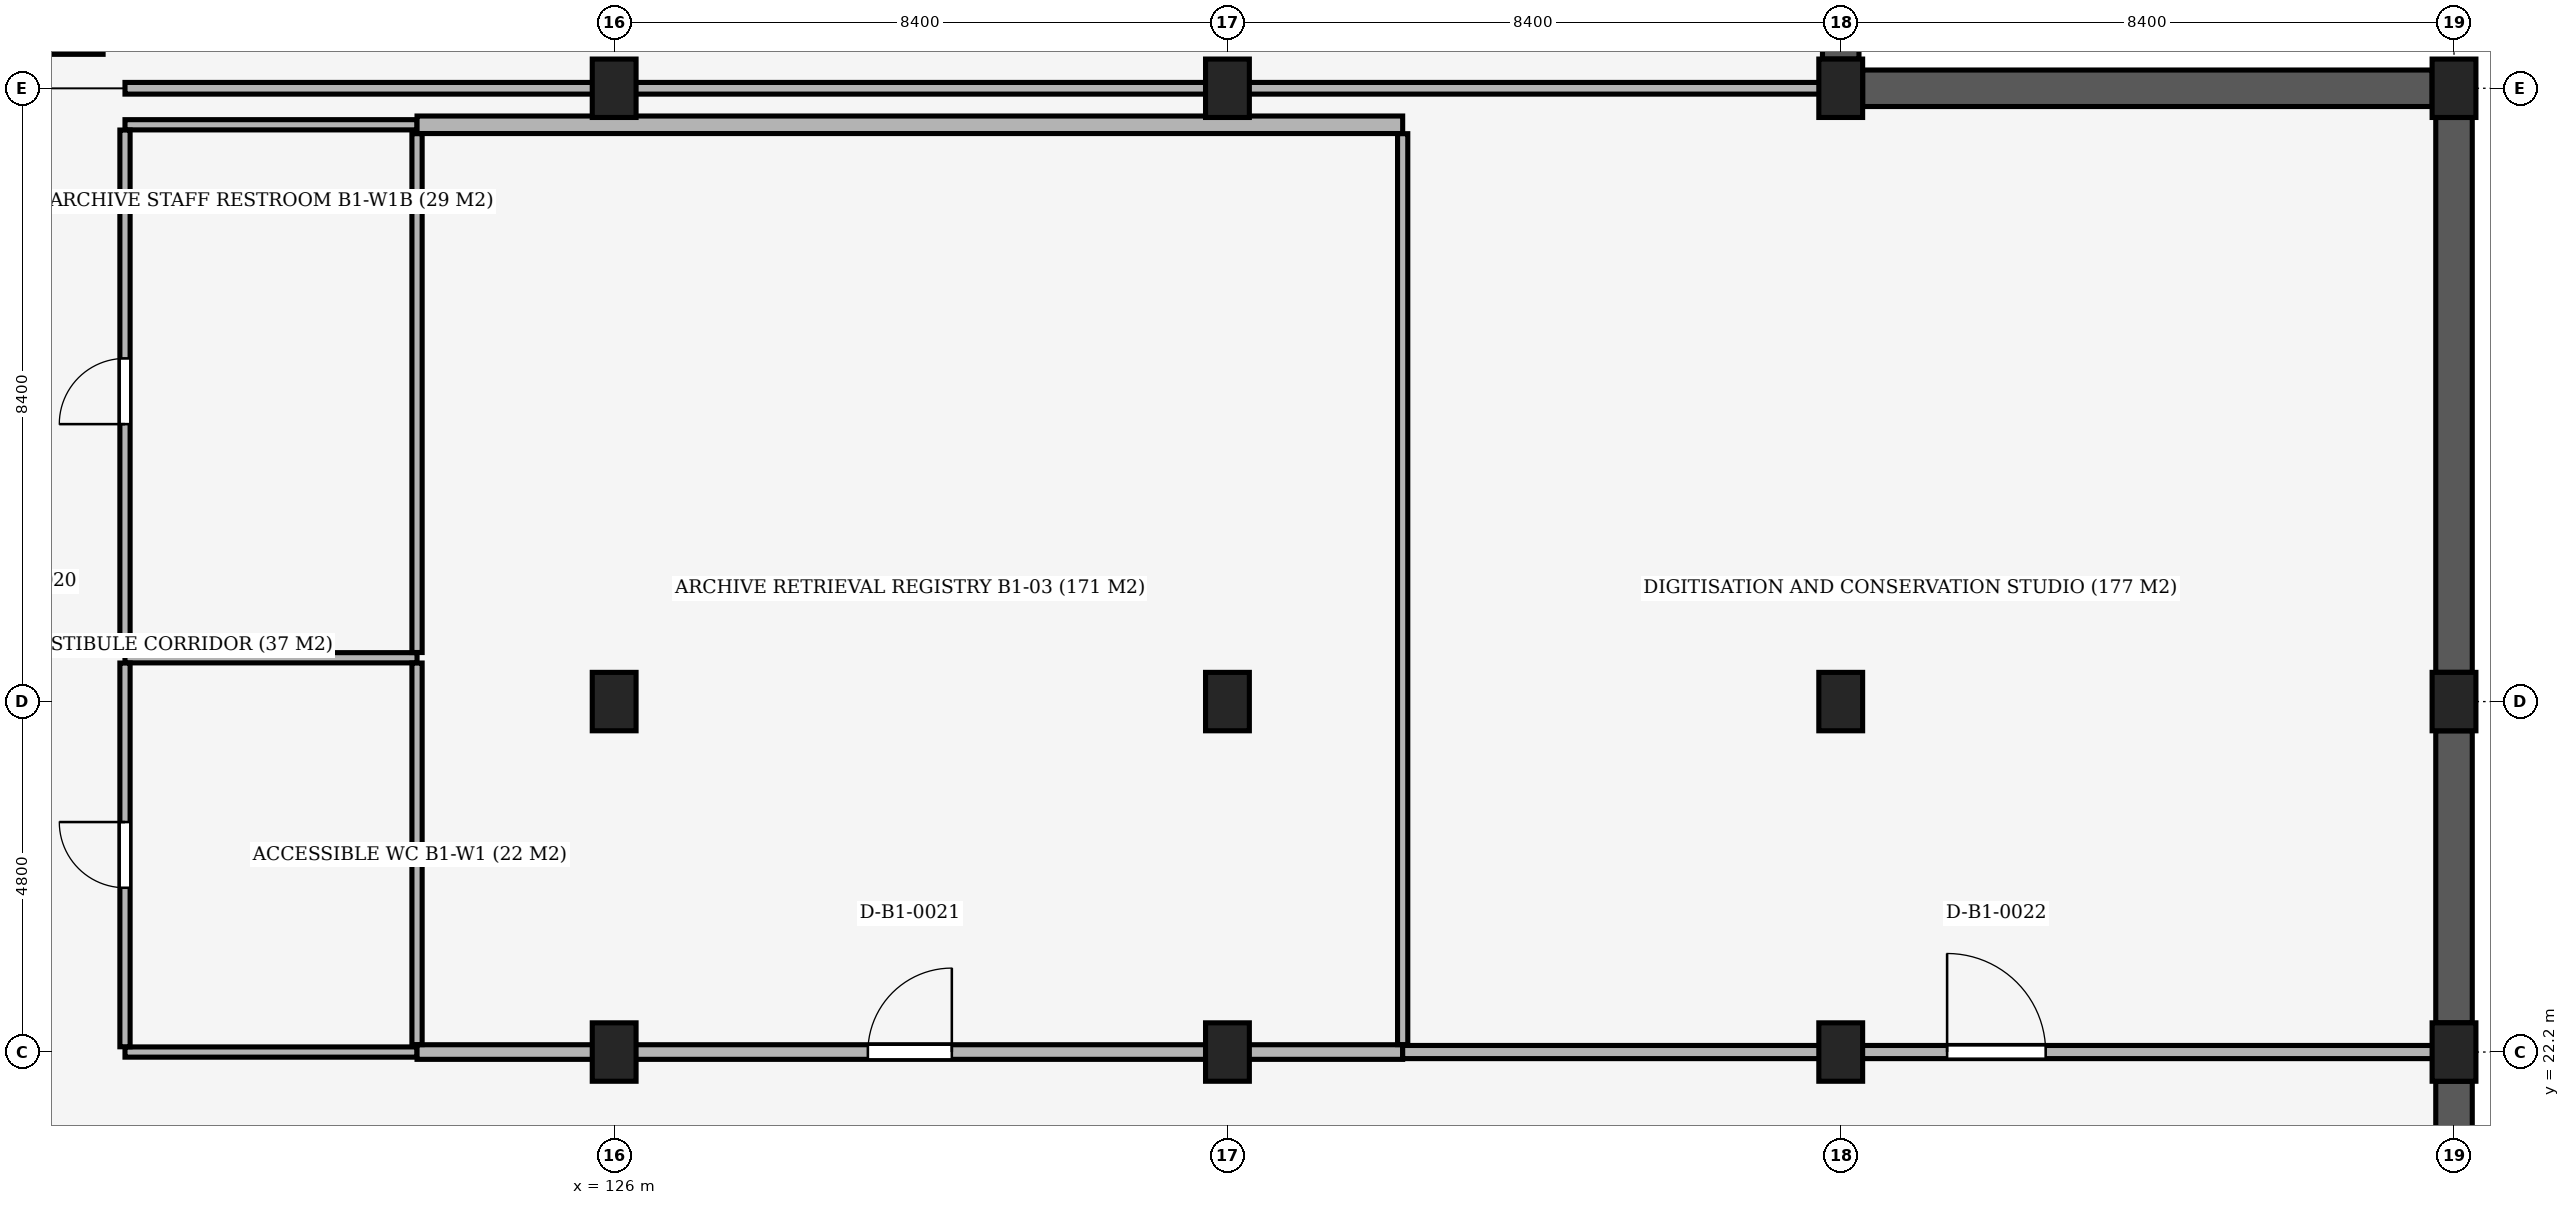
"""IFC4 building model, lengths in metres.
Left out: names, types, materials, properties, quantities, classifications, styles, units other than length and angle.
Written with IfcOpenShell. Run it as: python <this file> out.ifc"""

import sys

from ifc_helpers import new_model, si_unit, direction, frame, frame_2d, origin, origin_2d, place, context, subcontext, project, spatial, rectangle, extrude, element, fill, save


model = new_model("IFC4")
c1 = context("Model", 3, precision=1e-05, world=origin(), true_north=direction((0.0, 1.0)))
c2 = subcontext(c1, "Body", "Model", "MODEL_VIEW")
j1 = project(units=[si_unit("LENGTHUNIT", "METRE"), si_unit("PLANEANGLEUNIT", "RADIAN")], contexts=[c1])
p1 = place(None, origin())
s1 = spatial("IfcSite", under=j1, at=p1, CompositionType="ELEMENT")
p2 = place(p1, origin())
s2 = spatial("IfcBuilding", under=s1, at=p2, CompositionType="ELEMENT")
p3 = place(p2, frame((0.0, 0.0, -4.8)))
s3 = spatial("IfcBuildingStorey", under=s2, at=p3, CompositionType="ELEMENT", Elevation=-4.8)
for number, where, z_axis, x_axis in (
    (1, (126.0, 22.2, 0.0), (0.0, 0.0, 1.0), (1.0, 0.0, 0.0)),
    (2, (126.0, 27.0, 0.0), (0.0, 0.0, 1.0), (1.0, 0.0, 0.0)),
    (3, (126.0, 35.4, 0.0), (0.0, 0.0, 1.0), (1.0, 0.0, 0.0)),
    (4, (134.4, 22.2, 0.0), (0.0, 0.0, 1.0), (1.0, 0.0, 0.0)),
    (5, (134.4, 27.0, 0.0), (0.0, 0.0, 1.0), (1.0, 0.0, 0.0)),
    (6, (134.4, 35.4, 0.0), (0.0, 0.0, 1.0), (1.0, 0.0, 0.0)),
    (7, (142.8, 22.2, 0.0), (0.0, 0.0, 1.0), (1.0, 0.0, 0.0)),
    (8, (142.8, 27.0, 0.0), (0.0, 0.0, 1.0), (1.0, 0.0, 0.0)),
    (9, (142.8, 35.4, 0.0), (0.0, 0.0, 1.0), (1.0, 0.0, 0.0)),
    (10, (151.2, 22.2, 0.0), (0.0, 0.0, 1.0), (1.0, 0.0, 0.0)),
    (11, (151.2, 27.0, 0.0), (0.0, 0.0, 1.0), (1.0, 0.0, 0.0)),
    (12, (151.2, 35.4, 0.0), (0.0, 0.0, 1.0), (1.0, 0.0, 0.0)),
):
    element("IfcColumn", number, at=place(p3, frame(where, z_axis=z_axis, x_axis=x_axis)), inside=s3, PredefinedType="COLUMN", context=c2, shape_type="SweptSolid", body=[
        extrude(rectangle(XDim=0.6, YDim=0.8, at=origin_2d()), origin(), (0.0, 0.0, 1.0), 4.8),
    ])
p4 = place(p3, frame((142.8, 40.525, 0.0), z_axis=(0.0, 0.0, 1.0), x_axis=(0.0, -1.0, 0.0)))
e13 = element("IfcWall", 13, at=p4, inside=s3, PredefinedType="USERDEFINED", context=c2, shape_type="SweptSolid", body=[
    extrude(rectangle(XDim=4.725, YDim=0.5, at=frame_2d((2.362, 0.0))), origin(), (0.0, 0.0, 1.0), 3.85),
])
p5 = place(p3, frame((143.1, 35.4, 0.0), z_axis=(0.0, 0.0, 1.0), x_axis=(1.0, 0.0, 0.0)))
e14 = element("IfcWall", 14, at=p5, inside=s3, PredefinedType="USERDEFINED", context=c2, shape_type="SweptSolid", body=[
    extrude(rectangle(XDim=7.8, YDim=0.5, at=frame_2d((3.9, 0.0))), origin(), (0.0, 0.0, 1.0), 3.75),
])
p6 = place(p3, frame((151.2, 35.0, 0.0), z_axis=(0.0, 0.0, 1.0), x_axis=(0.0, -1.0, 0.0)))
e15 = element("IfcWall", 15, at=p6, inside=s3, PredefinedType="USERDEFINED", context=c2, shape_type="SweptSolid", body=[
    extrude(rectangle(XDim=7.6, YDim=0.5, at=frame_2d((3.8, 0.0))), origin(), (0.0, 0.0, 1.0), 3.7),
])
p7 = place(p3, frame((151.2, 26.6, 0.0), z_axis=(0.0, 0.0, 1.0), x_axis=(0.0, -1.0, 0.0)))
e16 = element("IfcWall", 16, at=p7, inside=s3, PredefinedType="USERDEFINED", context=c2, shape_type="SweptSolid", body=[
    extrude(rectangle(XDim=4.0, YDim=0.5, at=frame_2d((2.0, 0.0))), origin(), (0.0, 0.0, 1.0), 3.85),
])
p8 = place(p3, frame((151.2, 21.8, 0.0), z_axis=(0.0, 0.0, 1.0), x_axis=(0.0, -1.0, 0.0)))
e17 = element("IfcWall", 17, at=p8, inside=s3, PredefinedType="USERDEFINED", context=c2, shape_type="SweptSolid", body=[
    extrude(rectangle(XDim=16.0, YDim=0.5, at=frame_2d((8.0, 0.0))), origin(), (0.0, 0.0, 1.0), 3.35),
])
p9 = place(p3, frame((117.69, 36.09, 0.0), z_axis=(0.0, 0.0, 1.0), x_axis=(1.0, 0.0, 0.0)))
e18 = element("IfcWall", 18, at=p9, inside=s3, PredefinedType="USERDEFINED", context=c2, shape_type="SweptSolid", body=[
    extrude(rectangle(XDim=1.31, YDim=0.45, at=frame_2d((0.655, 0.0))), origin(), (0.0, 0.0, 1.0), 0.55),
])
p10 = place(p3, frame((119.3, 22.2, 0.0), z_axis=(0.0, 0.0, 1.0), x_axis=(1.0, 0.0, 0.0)))
e19 = element("IfcWall", 19, at=p10, inside=s3, PredefinedType="PARTITIONING", context=c2, shape_type="SweptSolid", body=[
    extrude(rectangle(XDim=4.0, YDim=0.14, at=frame_2d((2.0, 0.0))), origin(), (0.0, 0.0, 1.0), 3.75),
])
p11 = place(p3, frame((123.3, 22.2, 0.0), z_axis=(0.0, 0.0, 1.0), x_axis=(1.0, 0.0, 0.0)))
e20 = element("IfcWall", 20, at=p11, inside=s3, PredefinedType="PARTITIONING", context=c2, shape_type="SweptSolid", body=[
    extrude(rectangle(XDim=13.5, YDim=0.2, at=frame_2d((6.75, 0.0))), origin(), (0.0, 0.0, 1.0), 3.35),
])
p12 = place(p11, frame((6.175, 0.0, 0.0)))
e21 = element("IfcOpeningElement", 21, at=p12, cuts=e20, PredefinedType="OPENING", context=c2, shape_type="SweptSolid", body=[
    extrude(rectangle(XDim=1.15, YDim=2.15, at=frame_2d((0.575, 1.075))), frame((0.0, 0.115, 0.0), z_axis=(0.0, -1.0, 0.0), x_axis=(1.0, 0.0, 0.0)), (0.0, 0.0, 1.0), 0.23),
])
p13 = place(p3, frame((136.8, 22.2, 0.0), z_axis=(0.0, 0.0, 1.0), x_axis=(1.0, 0.0, 0.0)))
e22 = element("IfcWall", 22, at=p13, inside=s3, PredefinedType="PARTITIONING", context=c2, shape_type="SweptSolid", body=[
    extrude(rectangle(XDim=14.464, YDim=0.18, at=frame_2d((7.232, 0.0))), origin(), (0.0, 0.0, 1.0), 3.35),
])
p14 = place(p13, frame((7.457, 0.0, 0.0)))
e23 = element("IfcOpeningElement", 23, at=p14, cuts=e22, PredefinedType="OPENING", context=c2, shape_type="SweptSolid", body=[
    extrude(rectangle(XDim=1.35, YDim=2.2, at=frame_2d((0.675, 1.1))), frame((0.0, 0.105, 0.0), z_axis=(0.0, -1.0, 0.0), x_axis=(1.0, 0.0, 0.0)), (0.0, 0.0, 1.0), 0.21),
])
for number, where, z_axis, x_axis in (
    (24, (119.3, 27.6, 0.0), (0.0, 0.0, 1.0), (1.0, 0.0, 0.0)),
    (25, (119.3, 34.9, 0.0), (0.0, 0.0, 1.0), (1.0, 0.0, 0.0)),
):
    element("IfcWall", number, at=place(p3, frame(where, z_axis=z_axis, x_axis=x_axis)), inside=s3, PredefinedType="PARTITIONING", context=c2, shape_type="SweptSolid", body=[
        extrude(rectangle(XDim=4.0, YDim=0.14, at=frame_2d((2.0, 0.0))), origin(), (0.0, 0.0, 1.0), 4.5),
    ])
p15 = place(p3, frame((123.3, 34.9, 0.0), z_axis=(0.0, 0.0, 1.0), x_axis=(1.0, 0.0, 0.0)))
e26 = element("IfcWall", 26, at=p15, inside=s3, PredefinedType="PARTITIONING", context=c2, shape_type="SweptSolid", body=[
    extrude(rectangle(XDim=13.5, YDim=0.24, at=frame_2d((6.75, 0.0))), origin(), (0.0, 0.0, 1.0), 3.7),
])
p16 = place(p3, frame((119.3, 35.4, 0.0), z_axis=(0.0, 0.0, 1.0), x_axis=(1.0, 0.0, 0.0)))
e27 = element("IfcWall", 27, at=p16, inside=s3, PredefinedType="PARTITIONING", context=c2, shape_type="SweptSolid", body=[
    extrude(rectangle(XDim=23.421, YDim=0.16, at=frame_2d((11.71, 0.0))), origin(), (0.0, 0.0, 1.0), 3.75),
])
p17 = place(p3, frame((119.3, 22.272, 0.0), z_axis=(0.0, 0.0, 1.0), x_axis=(0.0, 1.0, 0.0)))
e28 = element("IfcWall", 28, at=p17, inside=s3, PredefinedType="PARTITIONING", context=c2, shape_type="SweptSolid", body=[
    extrude(rectangle(XDim=5.256, YDim=0.14, at=frame_2d((2.628, 0.0))), origin(), (0.0, 0.0, 1.0), 3.75),
])
p18 = place(p17, frame((2.178, 0.0, 0.0)))
e29 = element("IfcOpeningElement", 29, at=p18, cuts=e28, PredefinedType="OPENING", context=c2, shape_type="SweptSolid", body=[
    extrude(rectangle(XDim=0.9, YDim=2.1, at=frame_2d((0.45, 1.05))), frame((0.0, 0.085, 0.0), z_axis=(0.0, -1.0, 0.0), x_axis=(1.0, 0.0, 0.0)), (0.0, 0.0, 1.0), 0.17),
])
p19 = place(p3, frame((119.3, 27.672, 0.0), z_axis=(0.0, 0.0, 1.0), x_axis=(0.0, 1.0, 0.0)))
e30 = element("IfcWall", 30, at=p19, inside=s3, PredefinedType="PARTITIONING", context=c2, shape_type="SweptSolid", body=[
    extrude(rectangle(XDim=7.156, YDim=0.14, at=frame_2d((3.578, 0.0))), origin(), (0.0, 0.0, 1.0), 4.2),
])
p20 = place(p19, frame((3.128, 0.0, 0.0)))
e31 = element("IfcOpeningElement", 31, at=p20, cuts=e30, PredefinedType="OPENING", context=c2, shape_type="SweptSolid", body=[
    extrude(rectangle(XDim=0.9, YDim=2.1, at=frame_2d((0.45, 1.05))), frame((0.0, 0.085, 0.0), z_axis=(0.0, -1.0, 0.0), x_axis=(1.0, 0.0, 0.0)), (0.0, 0.0, 1.0), 0.17),
])
p21 = place(p3, frame((123.3, 22.302, 0.0), z_axis=(0.0, 0.0, 1.0), x_axis=(0.0, 1.0, 0.0)))
e32 = element("IfcWall", 32, at=p21, inside=s3, PredefinedType="PARTITIONING", context=c2, shape_type="SweptSolid", body=[
    extrude(rectangle(XDim=5.226, YDim=0.14, at=frame_2d((2.613, 0.0))), origin(), (0.0, 0.0, 1.0), 3.75),
])
p22 = place(p3, frame((123.3, 27.672, 0.0), z_axis=(0.0, 0.0, 1.0), x_axis=(0.0, 1.0, 0.0)))
e33 = element("IfcWall", 33, at=p22, inside=s3, PredefinedType="PARTITIONING", context=c2, shape_type="SweptSolid", body=[
    extrude(rectangle(XDim=7.106, YDim=0.14, at=frame_2d((3.553, 0.0))), origin(), (0.0, 0.0, 1.0), 4.2),
])
p23 = place(p3, frame((136.8, 22.302, 0.0), z_axis=(0.0, 0.0, 1.0), x_axis=(0.0, 1.0, 0.0)))
e34 = element("IfcWall", 34, at=p23, inside=s3, PredefinedType="PARTITIONING", context=c2, shape_type="SweptSolid", body=[
    extrude(rectangle(XDim=12.476, YDim=0.14, at=frame_2d((6.238, 0.0))), origin(), (0.0, 0.0, 1.0), 3.75),
])
p24 = place(p18, origin())
e35 = element("IfcDoor", 35, at=p24, inside=s3, OperationType="SINGLE_SWING_RIGHT", PredefinedType="DOOR", context=c2, shape_type="SweptSolid", body=[
    extrude(rectangle(XDim=0.9, YDim=2.1, at=frame_2d((0.45, 1.05))), frame((0.0, 0.025, 0.0), z_axis=(0.0, -1.0, 0.0), x_axis=(1.0, 0.0, 0.0)), (0.0, 0.0, 1.0), 0.05),
])
fill(e29, e35)
p25 = place(p20, origin())
e36 = element("IfcDoor", 36, at=p25, inside=s3, OperationType="SINGLE_SWING_LEFT", PredefinedType="DOOR", context=c2, shape_type="SweptSolid", body=[
    extrude(rectangle(XDim=0.9, YDim=2.1, at=frame_2d((0.45, 1.05))), frame((0.0, 0.025, 0.0), z_axis=(0.0, -1.0, 0.0), x_axis=(1.0, 0.0, 0.0)), (0.0, 0.0, 1.0), 0.05),
])
fill(e31, e36)
p26 = place(p12, origin())
e37 = element("IfcDoor", 37, at=p26, inside=s3, OperationType="SINGLE_SWING_RIGHT", PredefinedType="DOOR", context=c2, shape_type="SweptSolid", body=[
    extrude(rectangle(XDim=1.15, YDim=2.15, at=frame_2d((0.575, 1.075))), frame((0.0, 0.025, 0.0), z_axis=(0.0, -1.0, 0.0), x_axis=(1.0, 0.0, 0.0)), (0.0, 0.0, 1.0), 0.05),
])
fill(e21, e37)
p27 = place(p14, origin())
e38 = element("IfcDoor", 38, at=p27, inside=s3, OperationType="SINGLE_SWING_LEFT", PredefinedType="DOOR", context=c2, shape_type="SweptSolid", body=[
    extrude(rectangle(XDim=1.35, YDim=2.2, at=frame_2d((0.675, 1.1))), frame((0.0, 0.025, 0.0), z_axis=(0.0, -1.0, 0.0), x_axis=(1.0, 0.0, 0.0)), (0.0, 0.0, 1.0), 0.05),
])
fill(e23, e38)
save(model, sys.argv[1])
